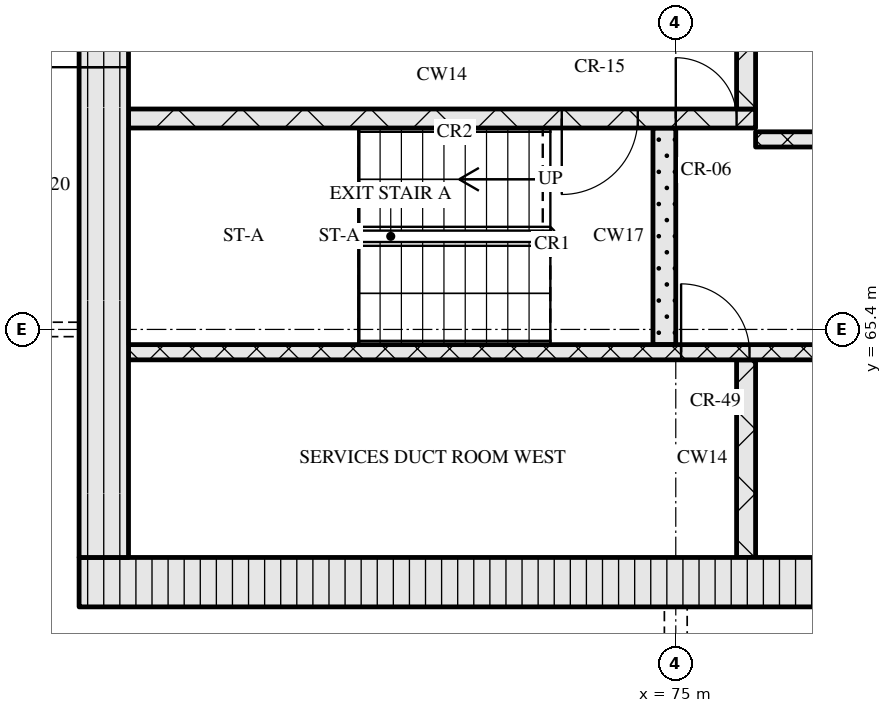
"""IFC4 building model, lengths in metres.
Left out: names, types, materials, properties, quantities, classifications, styles, units other than length and angle.
Written with IfcOpenShell. Run it as: python <this file> out.ifc"""

import sys

from ifc_helpers import new_model, si_unit, direction, frame, frame_2d, origin, place, context, subcontext, project, spatial, rectangle, extrude, element, fill, save


model = new_model("IFC4")
c1 = context("Model", 3, precision=1e-05, world=origin(), true_north=direction((0.0, 1.0)))
c2 = subcontext(c1, "Body", "Model", "MODEL_VIEW")
j1 = project(units=[si_unit("LENGTHUNIT", "METRE"), si_unit("PLANEANGLEUNIT", "RADIAN")], contexts=[c1])
p1 = place(None, origin())
s1 = spatial("IfcSite", under=j1, at=p1, CompositionType="ELEMENT")
p2 = place(p1, origin())
s2 = spatial("IfcBuilding", under=s1, at=p2, CompositionType="ELEMENT")
p3 = place(p2, frame((0.0, 0.0, 209.1)))
s3 = spatial("IfcBuildingStorey", under=s2, at=p3, CompositionType="ELEMENT", Elevation=209.1)
p4 = place(p3, frame((67.15, 62.075, 0.0), z_axis=(0.0, 0.0, 1.0), x_axis=(1.0, 0.0, 0.0)))
e1 = element("IfcWall", 1, at=p4, inside=s3, PredefinedType="SOLIDWALL", context=c2, shape_type="SweptSolid", body=[
    extrude(rectangle(XDim=40.9, YDim=0.65, at=frame_2d((20.45, 0.0))), origin(), (0.0, 0.0, 1.0), 3.32),
])
p5 = place(p4, frame((20.8, 0.0, 0.0)))
e2 = element("IfcOpeningElement", 2, at=p5, cuts=e1, PredefinedType="OPENING", context=c2, shape_type="SweptSolid", body=[
    extrude(rectangle(XDim=1.8, YDim=2.1, at=frame_2d((0.9, 1.05))), frame((0.0, 0.335, 0.0), z_axis=(0.0, -1.0, 0.0), x_axis=(1.0, 0.0, 0.0)), (0.0, 0.0, 1.0), 0.67),
])
p6 = place(p3, frame((67.475, 62.4, 0.0), z_axis=(0.0, 0.0, 1.0), x_axis=(0.0, 1.0, 0.0)))
e3 = element("IfcWall", 3, at=p6, inside=s3, PredefinedType="SOLIDWALL", context=c2, shape_type="SweptSolid", body=[
    extrude(rectangle(XDim=12.0, YDim=0.65, at=frame_2d((6.0, 0.0))), origin(), (0.0, 0.0, 1.0), 3.32),
])
p7 = place(p6, frame((6.45, 0.0, 0.0)))
e4 = element("IfcOpeningElement", 4, at=p7, cuts=e3, PredefinedType="OPENING", context=c2, shape_type="SweptSolid", body=[
    extrude(rectangle(XDim=1.2, YDim=2.1, at=frame_2d((0.6, 1.05))), frame((0.0, 0.335, 0.0), z_axis=(0.0, -1.0, 0.0), x_axis=(1.0, 0.0, 0.0)), (0.0, 0.0, 1.0), 0.67),
])
p8 = place(p3, frame((75.925, 62.4, 0.0), z_axis=(0.0, 0.0, 1.0), x_axis=(0.0, 1.0, 0.0)))
e5 = element("IfcWall", 5, at=p8, inside=s3, PredefinedType="SOLIDWALL", context=c2, shape_type="SweptSolid", body=[
    extrude(rectangle(XDim=2.6, YDim=0.25, at=frame_2d((1.3, 0.0))), origin(), (0.0, 0.0, 1.0), 3.32),
])
p9 = place(p3, frame((67.8, 65.1, 0.0), z_axis=(0.0, 0.0, 1.0), x_axis=(1.0, 0.0, 0.0)))
e6 = element("IfcWall", 6, at=p9, inside=s3, PredefinedType="SOLIDWALL", context=c2, shape_type="SweptSolid", body=[
    extrude(rectangle(XDim=18.5, YDim=0.2, at=frame_2d((9.25, 0.0))), origin(), (0.0, 0.0, 1.0), 3.32),
])
p10 = place(p9, frame((7.27, 0.0, 0.0)))
e7 = element("IfcOpeningElement", 7, at=p10, cuts=e6, PredefinedType="OPENING", context=c2, shape_type="SweptSolid", body=[
    extrude(rectangle(XDim=0.9, YDim=2.1, at=frame_2d((0.45, 1.05))), frame((0.0, 0.11, 0.0), z_axis=(0.0, -1.0, 0.0), x_axis=(1.0, 0.0, 0.0)), (0.0, 0.0, 1.0), 0.22),
])
p11 = place(p9, frame((11.45, 0.0, 0.0)))
e8 = element("IfcOpeningElement", 8, at=p11, cuts=e6, PredefinedType="OPENING", context=c2, shape_type="SweptSolid", body=[
    extrude(rectangle(XDim=0.9, YDim=2.1, at=frame_2d((0.45, 1.05))), frame((0.0, 0.11, 0.0), z_axis=(0.0, -1.0, 0.0), x_axis=(1.0, 0.0, 0.0)), (0.0, 0.0, 1.0), 0.22),
])
p12 = place(p9, frame((16.7, 0.0, 0.0)))
e9 = element("IfcOpeningElement", 9, at=p12, cuts=e6, PredefinedType="OPENING", context=c2, shape_type="SweptSolid", body=[
    extrude(rectangle(XDim=0.9, YDim=2.1, at=frame_2d((0.45, 1.05))), frame((0.0, 0.11, 0.0), z_axis=(0.0, -1.0, 0.0), x_axis=(1.0, 0.0, 0.0)), (0.0, 0.0, 1.0), 0.22),
])
p13 = place(p3, frame((74.85, 65.2, 0.0), z_axis=(0.0, 0.0, 1.0), x_axis=(0.0, 1.0, 0.0)))
e10 = element("IfcWall", 10, at=p13, inside=s3, PredefinedType="SOLIDWALL", context=c2, shape_type="SweptSolid", body=[
    extrude(rectangle(XDim=2.85, YDim=0.3, at=frame_2d((1.425, 0.0))), origin(), (0.0, 0.0, 1.0), 3.32),
])
p14 = place(p3, frame((76.05, 67.9, 0.0), z_axis=(0.0, 0.0, 1.0), x_axis=(1.0, 0.0, 0.0)))
e11 = element("IfcWall", 11, at=p14, inside=s3, PredefinedType="SOLIDWALL", context=c2, shape_type="SweptSolid", body=[
    extrude(rectangle(XDim=23.1, YDim=0.2, at=frame_2d((11.55, 0.0))), origin(), (0.0, 0.0, 1.0), 3.32),
])
p15 = place(p14, frame((1.4, 0.0, 0.0)))
e12 = element("IfcOpeningElement", 12, at=p15, cuts=e11, PredefinedType="OPENING", context=c2, shape_type="SweptSolid", body=[
    extrude(rectangle(XDim=0.9, YDim=2.1, at=frame_2d((0.45, 1.05))), frame((0.0, 0.11, 0.0), z_axis=(0.0, -1.0, 0.0), x_axis=(1.0, 0.0, 0.0)), (0.0, 0.0, 1.0), 0.22),
])
p16 = place(p14, frame((5.11, 0.0, 0.0)))
e13 = element("IfcOpeningElement", 13, at=p16, cuts=e11, PredefinedType="OPENING", context=c2, shape_type="SweptSolid", body=[
    extrude(rectangle(XDim=0.9, YDim=2.1, at=frame_2d((0.45, 1.05))), frame((0.0, 0.11, 0.0), z_axis=(0.0, -1.0, 0.0), x_axis=(1.0, 0.0, 0.0)), (0.0, 0.0, 1.0), 0.22),
])
p17 = place(p14, frame((8.45, 0.0, 0.0)))
e14 = element("IfcOpeningElement", 14, at=p17, cuts=e11, PredefinedType="OPENING", context=c2, shape_type="SweptSolid", body=[
    extrude(rectangle(XDim=0.9, YDim=2.1, at=frame_2d((0.45, 1.05))), frame((0.0, 0.11, 0.0), z_axis=(0.0, -1.0, 0.0), x_axis=(1.0, 0.0, 0.0)), (0.0, 0.0, 1.0), 0.22),
])
p18 = place(p14, frame((10.91, 0.0, 0.0)))
e15 = element("IfcOpeningElement", 15, at=p18, cuts=e11, PredefinedType="OPENING", context=c2, shape_type="SweptSolid", body=[
    extrude(rectangle(XDim=0.9, YDim=2.1, at=frame_2d((0.45, 1.05))), frame((0.0, 0.11, 0.0), z_axis=(0.0, -1.0, 0.0), x_axis=(1.0, 0.0, 0.0)), (0.0, 0.0, 1.0), 0.22),
])
p19 = place(p14, frame((13.55, 0.0, 0.0)))
e16 = element("IfcOpeningElement", 16, at=p19, cuts=e11, PredefinedType="OPENING", context=c2, shape_type="SweptSolid", body=[
    extrude(rectangle(XDim=1.0, YDim=2.1, at=frame_2d((0.5, 1.05))), frame((0.0, 0.11, 0.0), z_axis=(0.0, -1.0, 0.0), x_axis=(1.0, 0.0, 0.0)), (0.0, 0.0, 1.0), 0.22),
])
p20 = place(p14, frame((16.2, 0.0, 0.0)))
e17 = element("IfcOpeningElement", 17, at=p20, cuts=e11, PredefinedType="OPENING", context=c2, shape_type="SweptSolid", body=[
    extrude(rectangle(XDim=1.1, YDim=2.1, at=frame_2d((0.55, 1.05))), frame((0.0, 0.11, 0.0), z_axis=(0.0, -1.0, 0.0), x_axis=(1.0, 0.0, 0.0)), (0.0, 0.0, 1.0), 0.22),
])
p21 = place(p14, frame((18.7, 0.0, 0.0)))
e18 = element("IfcOpeningElement", 18, at=p21, cuts=e11, PredefinedType="OPENING", context=c2, shape_type="SweptSolid", body=[
    extrude(rectangle(XDim=1.1, YDim=2.1, at=frame_2d((0.55, 1.05))), frame((0.0, 0.11, 0.0), z_axis=(0.0, -1.0, 0.0), x_axis=(1.0, 0.0, 0.0)), (0.0, 0.0, 1.0), 0.22),
])
p22 = place(p14, frame((21.2, 0.0, 0.0)))
e19 = element("IfcOpeningElement", 19, at=p22, cuts=e11, PredefinedType="OPENING", context=c2, shape_type="SweptSolid", body=[
    extrude(rectangle(XDim=1.1, YDim=2.1, at=frame_2d((0.55, 1.05))), frame((0.0, 0.11, 0.0), z_axis=(0.0, -1.0, 0.0), x_axis=(1.0, 0.0, 0.0)), (0.0, 0.0, 1.0), 0.22),
])
p23 = place(p3, frame((67.8, 68.175, 0.0), z_axis=(0.0, 0.0, 1.0), x_axis=(1.0, 0.0, 0.0)))
e20 = element("IfcWall", 20, at=p23, inside=s3, PredefinedType="SOLIDWALL", context=c2, shape_type="SweptSolid", body=[
    extrude(rectangle(XDim=8.25, YDim=0.25, at=frame_2d((4.125, 0.0))), origin(), (0.0, 0.0, 1.0), 3.32),
])
p24 = place(p23, frame((5.7, 0.0, 0.0)))
e21 = element("IfcOpeningElement", 21, at=p24, cuts=e20, PredefinedType="OPENING", context=c2, shape_type="SweptSolid", body=[
    extrude(rectangle(XDim=1.0, YDim=2.1, at=frame_2d((0.5, 1.05))), frame((0.0, 0.135, 0.0), z_axis=(0.0, -1.0, 0.0), x_axis=(1.0, 0.0, 0.0)), (0.0, 0.0, 1.0), 0.27),
])
p25 = place(p23, frame((7.2, 0.0, 0.0)))
e22 = element("IfcOpeningElement", 22, at=p25, cuts=e20, PredefinedType="OPENING", context=c2, shape_type="SweptSolid", body=[
    extrude(rectangle(XDim=0.8, YDim=2.1, at=frame_2d((0.4, 1.05))), frame((0.0, 0.135, 0.0), z_axis=(0.0, -1.0, 0.0), x_axis=(1.0, 0.0, 0.0)), (0.0, 0.0, 1.0), 0.27),
])
p26 = place(p3, frame((75.925, 68.3, 0.0), z_axis=(0.0, 0.0, 1.0), x_axis=(0.0, 1.0, 0.0)))
e23 = element("IfcWall", 23, at=p26, inside=s3, PredefinedType="SOLIDWALL", context=c2, shape_type="SweptSolid", body=[
    extrude(rectangle(XDim=2.3, YDim=0.25, at=frame_2d((1.15, 0.0))), origin(), (0.0, 0.0, 1.0), 3.32),
])
p27 = place(p10, origin())
e24 = element("IfcDoor", 24, at=p27, inside=s3, OperationType="SINGLE_SWING_LEFT", PredefinedType="DOOR", context=c2, shape_type="SweptSolid", body=[
    extrude(rectangle(XDim=0.9, YDim=2.1, at=frame_2d((0.45, 1.05))), frame((0.0, 0.025, 0.0), z_axis=(0.0, -1.0, 0.0), x_axis=(1.0, 0.0, 0.0)), (0.0, 0.0, 1.0), 0.05),
])
fill(e7, e24)
p28 = place(p24, origin())
e25 = element("IfcDoor", 25, at=p28, inside=s3, OperationType="SINGLE_SWING_RIGHT", PredefinedType="DOOR", context=c2, shape_type="SweptSolid", body=[
    extrude(rectangle(XDim=1.0, YDim=2.1, at=frame_2d((0.5, 1.05))), frame((0.0, 0.025, 0.0), z_axis=(0.0, -1.0, 0.0), x_axis=(1.0, 0.0, 0.0)), (0.0, 0.0, 1.0), 0.05),
])
fill(e21, e25)
p29 = place(p25, origin())
e26 = element("IfcDoor", 26, at=p29, inside=s3, OperationType="SINGLE_SWING_LEFT", PredefinedType="DOOR", context=c2, shape_type="SweptSolid", body=[
    extrude(rectangle(XDim=0.8, YDim=2.1, at=frame_2d((0.4, 1.05))), frame((0.0, 0.025, 0.0), z_axis=(0.0, -1.0, 0.0), x_axis=(1.0, 0.0, 0.0)), (0.0, 0.0, 1.0), 0.05),
])
fill(e22, e26)
p30 = place(p7, origin())
e27 = element("IfcDoor", 27, at=p30, inside=s3, OperationType="SINGLE_SWING_LEFT", PredefinedType="DOOR", context=c2, shape_type="SweptSolid", body=[
    extrude(rectangle(XDim=1.2, YDim=2.1, at=frame_2d((0.6, 1.05))), frame((0.0, 0.025, 0.0), z_axis=(0.0, -1.0, 0.0), x_axis=(1.0, 0.0, 0.0)), (0.0, 0.0, 1.0), 0.05),
])
fill(e4, e27)
save(model, sys.argv[1])
